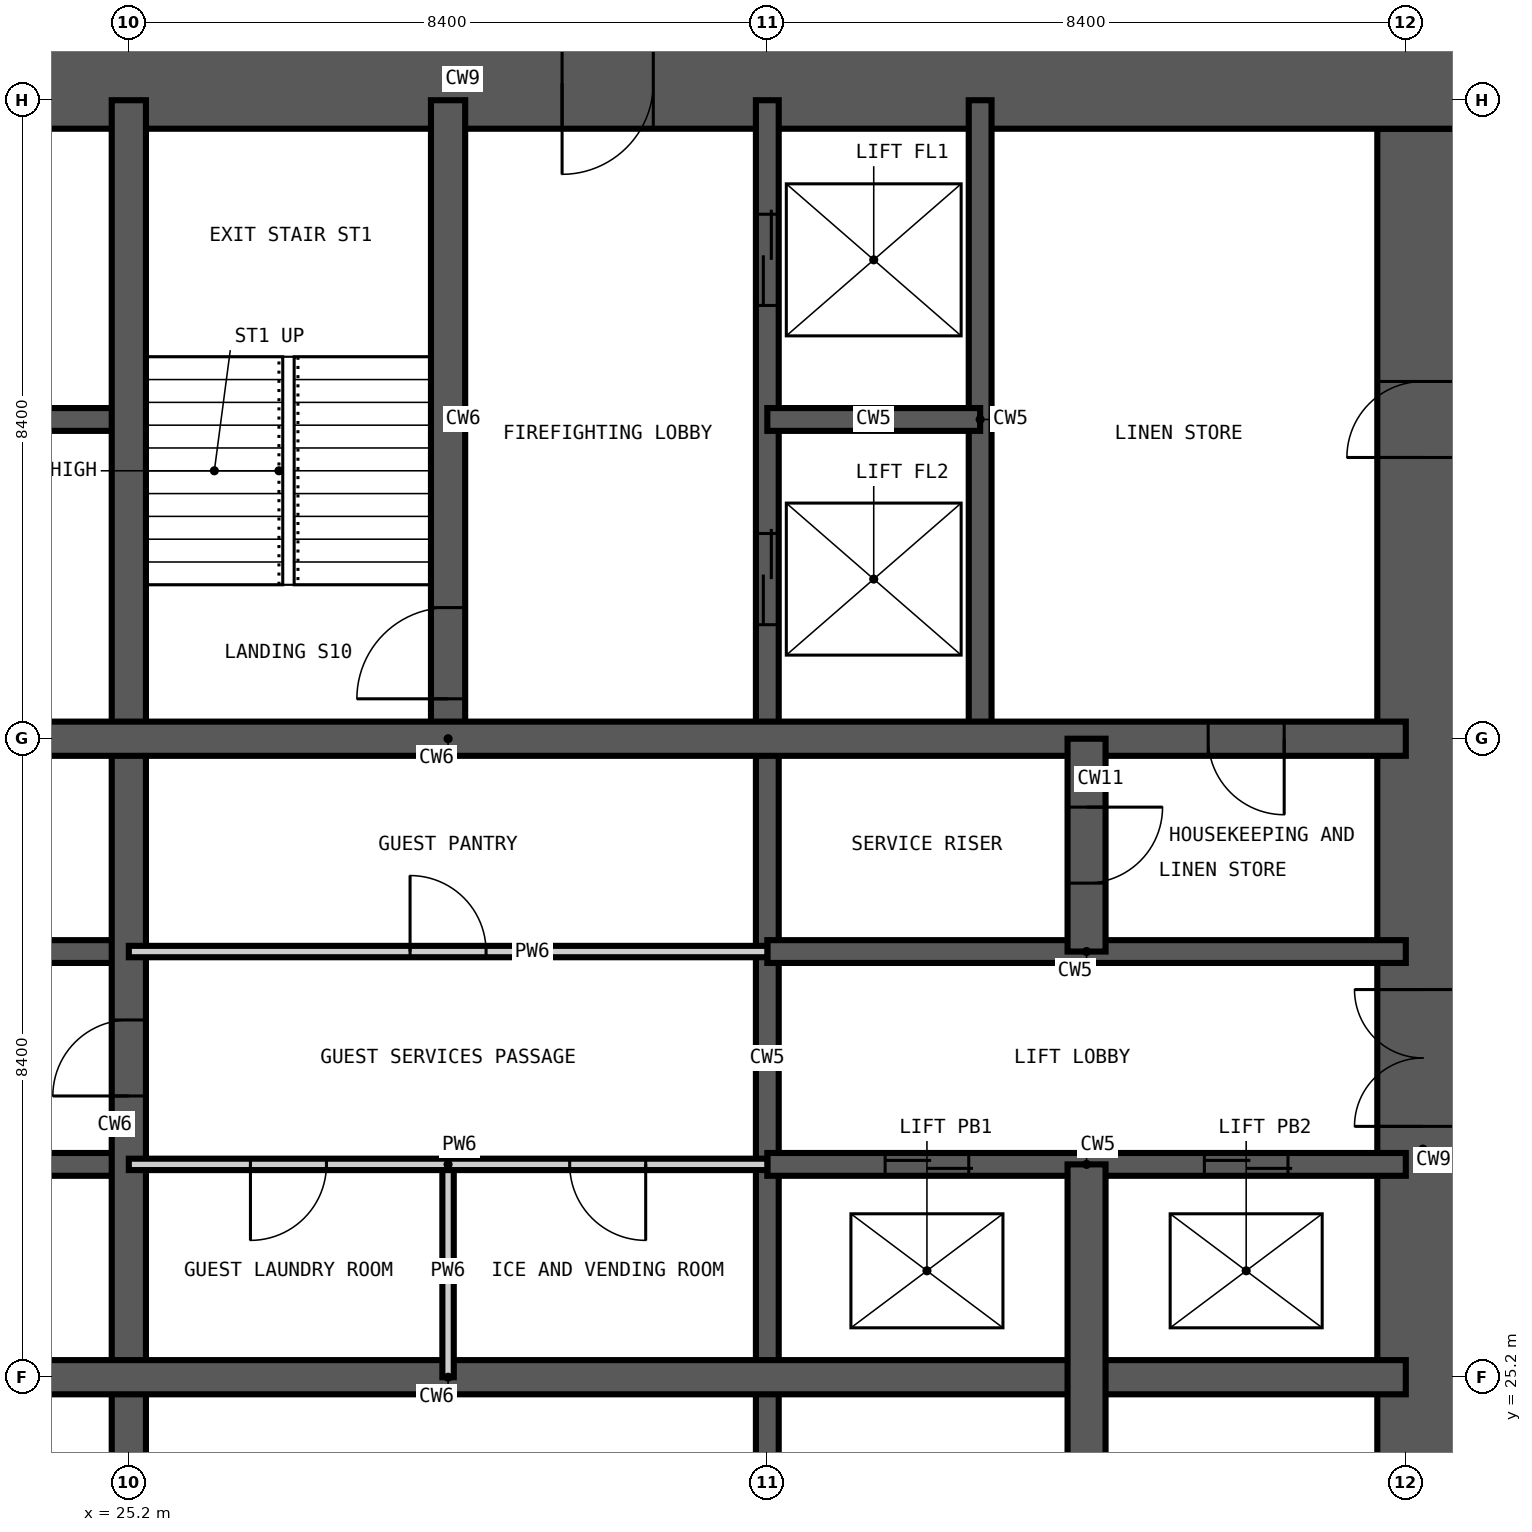
"""IFC4 building model, lengths in metres.
Left out: names, types, materials, properties, quantities, classifications, styles, units other than length and angle.
Written with IfcOpenShell. Run it as: python <this file> out.ifc"""

import sys

from ifc_helpers import new_model, si_unit, direction, frame, frame_2d, origin, place, context, subcontext, project, spatial, rectangle, extrude, element, fill, save


model = new_model("IFC4")
c1 = context("Model", 3, precision=1e-05, world=origin(), true_north=direction((0.0, 1.0)))
c2 = subcontext(c1, "Body", "Model", "MODEL_VIEW")
j1 = project(units=[si_unit("LENGTHUNIT", "METRE"), si_unit("PLANEANGLEUNIT", "RADIAN")], contexts=[c1])
p1 = place(None, origin())
s1 = spatial("IfcSite", under=j1, at=p1, CompositionType="ELEMENT")
p2 = place(p1, origin())
s2 = spatial("IfcBuilding", under=s1, at=p2, CompositionType="ELEMENT")
p3 = place(p2, frame((0.0, 0.0, 111.6)))
s3 = spatial("IfcBuildingStorey", under=s2, at=p3, CompositionType="ELEMENT", Elevation=111.6)
p4 = place(p3, frame((42.225, 17.175, -0.35), z_axis=(0.0, 0.0, 1.0), x_axis=(0.0, 1.0, 0.0)))
e1 = element("IfcWall", 1, at=p4, inside=s3, PredefinedType="SHEAR", context=c2, shape_type="SweptSolid", body=[
    extrude(rectangle(XDim=24.45, YDim=1.2, at=frame_2d((12.225, 0.0))), origin(), (0.0, 0.0, 1.0), 3.6),
])
p5 = place(p4, frame((0.425, 0.0, 0.35)))
e2 = element("IfcOpeningElement", 2, at=p5, cuts=e1, PredefinedType="OPENING", context=c2, shape_type="SweptSolid", body=[
    extrude(rectangle(XDim=1.2, YDim=2.2, at=frame_2d((0.6, 1.1))), frame((0.0, 0.61, 0.0), z_axis=(0.0, -1.0, 0.0), x_axis=(1.0, 0.0, 0.0)), (0.0, 0.0, 1.0), 1.22),
])
p6 = place(p4, frame((11.325, 0.0, 0.35)))
e3 = element("IfcOpeningElement", 3, at=p6, cuts=e1, PredefinedType="OPENING", context=c2, shape_type="SweptSolid", body=[
    extrude(rectangle(XDim=1.8, YDim=2.2, at=frame_2d((0.9, 1.1))), frame((0.0, 0.61, 0.0), z_axis=(0.0, -1.0, 0.0), x_axis=(1.0, 0.0, 0.0)), (0.0, 0.0, 1.0), 1.22),
])
p7 = place(p4, frame((20.125, 0.0, 0.35)))
e4 = element("IfcOpeningElement", 4, at=p7, cuts=e1, PredefinedType="OPENING", context=c2, shape_type="SweptSolid", body=[
    extrude(rectangle(XDim=1.0, YDim=2.1, at=frame_2d((0.5, 1.05))), frame((0.0, 0.61, 0.0), z_axis=(0.0, -1.0, 0.0), x_axis=(1.0, 0.0, 0.0)), (0.0, 0.0, 1.0), 1.22),
])
p8 = place(p3, frame((42.825, 42.225, -0.35), z_axis=(0.0, 0.0, 1.0), x_axis=(-1.0, 0.0, 0.0)))
e5 = element("IfcWall", 5, at=p8, inside=s3, PredefinedType="SHEAR", context=c2, shape_type="SweptSolid", body=[
    extrude(rectangle(XDim=26.85, YDim=1.2, at=frame_2d((13.425, 0.0))), origin(), (0.0, 0.0, 1.0), 3.6),
])
p9 = place(p8, frame((21.325, 0.0, 0.35)))
e6 = element("IfcOpeningElement", 6, at=p9, cuts=e5, PredefinedType="OPENING", context=c2, shape_type="SweptSolid", body=[
    extrude(rectangle(XDim=1.0, YDim=2.1, at=frame_2d((0.5, 1.05))), frame((0.0, 0.61, 0.0), z_axis=(0.0, -1.0, 0.0), x_axis=(1.0, 0.0, 0.0)), (0.0, 0.0, 1.0), 1.22),
])
p10 = place(p8, frame((10.725, 0.0, 0.35)))
e7 = element("IfcOpeningElement", 7, at=p10, cuts=e5, PredefinedType="OPENING", context=c2, shape_type="SweptSolid", body=[
    extrude(rectangle(XDim=1.2, YDim=2.2, at=frame_2d((0.6, 1.1))), frame((0.0, 0.61, 0.0), z_axis=(0.0, -1.0, 0.0), x_axis=(1.0, 0.0, 0.0)), (0.0, 0.0, 1.0), 1.22),
])
p11 = place(p3, frame((33.6, 16.8, -0.35), z_axis=(0.0, 0.0, 1.0), x_axis=(0.0, 1.0, 0.0)))
e8 = element("IfcWall", 8, at=p11, inside=s3, PredefinedType="SHEAR", context=c2, shape_type="SweptSolid", body=[
    extrude(rectangle(XDim=25.2, YDim=0.3, at=frame_2d((12.6, 0.0))), origin(), (0.0, 0.0, 1.0), 3.6),
])
p12 = place(p11, frame((22.5, 0.0, 0.35)))
e9 = element("IfcOpeningElement", 9, at=p12, cuts=e8, PredefinedType="OPENING", context=c2, shape_type="SweptSolid", body=[
    extrude(rectangle(XDim=1.2, YDim=2.2, at=frame_2d((0.6, 1.1))), frame((0.0, 0.16, 0.0), z_axis=(0.0, -1.0, 0.0), x_axis=(1.0, 0.0, 0.0)), (0.0, 0.0, 1.0), 0.32),
])
p13 = place(p11, frame((18.3, 0.0, 0.35)))
e10 = element("IfcOpeningElement", 10, at=p13, cuts=e8, PredefinedType="OPENING", context=c2, shape_type="SweptSolid", body=[
    extrude(rectangle(XDim=1.2, YDim=2.2, at=frame_2d((0.6, 1.1))), frame((0.0, 0.16, 0.0), z_axis=(0.0, -1.0, 0.0), x_axis=(1.0, 0.0, 0.0)), (0.0, 0.0, 1.0), 0.32),
])
p14 = place(p3, frame((36.4, 33.6, -0.35), z_axis=(0.0, 0.0, 1.0), x_axis=(0.0, 1.0, 0.0)))
e11 = element("IfcWall", 11, at=p14, inside=s3, PredefinedType="SHEAR", context=c2, shape_type="SweptSolid", body=[
    extrude(rectangle(XDim=8.4, YDim=0.3, at=frame_2d((4.2, 0.0))), origin(), (0.0, 0.0, 1.0), 3.6),
])
p15 = place(p3, frame((16.8, 28.0, -0.35), z_axis=(0.0, 0.0, 1.0), x_axis=(1.0, 0.0, 0.0)))
e12 = element("IfcWall", 12, at=p15, inside=s3, PredefinedType="SHEAR", context=c2, shape_type="SweptSolid", body=[
    extrude(rectangle(XDim=8.4, YDim=0.3, at=frame_2d((4.2, 0.0))), origin(), (0.0, 0.0, 1.0), 3.6),
])
p16 = place(p15, frame((1.55, 0.0, 0.35)))
e13 = element("IfcOpeningElement", 13, at=p16, cuts=e12, PredefinedType="OPENING", context=c2, shape_type="SweptSolid", body=[
    extrude(rectangle(XDim=1.1, YDim=2.2, at=frame_2d((0.55, 1.1))), frame((0.0, 0.16, 0.0), z_axis=(0.0, -1.0, 0.0), x_axis=(1.0, 0.0, 0.0)), (0.0, 0.0, 1.0), 0.32),
])
p17 = place(p15, frame((5.75, 0.0, 0.35)))
e14 = element("IfcOpeningElement", 14, at=p17, cuts=e12, PredefinedType="OPENING", context=c2, shape_type="SweptSolid", body=[
    extrude(rectangle(XDim=1.1, YDim=2.2, at=frame_2d((0.55, 1.1))), frame((0.0, 0.16, 0.0), z_axis=(0.0, -1.0, 0.0), x_axis=(1.0, 0.0, 0.0)), (0.0, 0.0, 1.0), 0.32),
])
p18 = place(p3, frame((33.6, 28.0, -0.35), z_axis=(0.0, 0.0, 1.0), x_axis=(1.0, 0.0, 0.0)))
e15 = element("IfcWall", 15, at=p18, inside=s3, PredefinedType="SHEAR", context=c2, shape_type="SweptSolid", body=[
    extrude(rectangle(XDim=8.4, YDim=0.3, at=frame_2d((4.2, 0.0))), origin(), (0.0, 0.0, 1.0), 3.6),
])
p19 = place(p18, frame((1.55, 0.0, 0.35)))
e16 = element("IfcOpeningElement", 16, at=p19, cuts=e15, PredefinedType="OPENING", context=c2, shape_type="SweptSolid", body=[
    extrude(rectangle(XDim=1.1, YDim=2.2, at=frame_2d((0.55, 1.1))), frame((0.0, 0.16, 0.0), z_axis=(0.0, -1.0, 0.0), x_axis=(1.0, 0.0, 0.0)), (0.0, 0.0, 1.0), 0.32),
])
p20 = place(p18, frame((5.75, 0.0, 0.35)))
e17 = element("IfcOpeningElement", 17, at=p20, cuts=e15, PredefinedType="OPENING", context=c2, shape_type="SweptSolid", body=[
    extrude(rectangle(XDim=1.1, YDim=2.2, at=frame_2d((0.55, 1.1))), frame((0.0, 0.16, 0.0), z_axis=(0.0, -1.0, 0.0), x_axis=(1.0, 0.0, 0.0)), (0.0, 0.0, 1.0), 0.32),
])
p21 = place(p3, frame((16.8, 30.8, -0.35), z_axis=(0.0, 0.0, 1.0), x_axis=(1.0, 0.0, 0.0)))
e18 = element("IfcWall", 18, at=p21, inside=s3, PredefinedType="SHEAR", context=c2, shape_type="SweptSolid", body=[
    extrude(rectangle(XDim=8.4, YDim=0.3, at=frame_2d((4.2, 0.0))), origin(), (0.0, 0.0, 1.0), 3.6),
])
p22 = place(p21, frame((1.55, 0.0, 0.35)))
e19 = element("IfcOpeningElement", 19, at=p22, cuts=e18, PredefinedType="OPENING", context=c2, shape_type="SweptSolid", body=[
    extrude(rectangle(XDim=1.1, YDim=2.2, at=frame_2d((0.55, 1.1))), frame((0.0, 0.16, 0.0), z_axis=(0.0, -1.0, 0.0), x_axis=(1.0, 0.0, 0.0)), (0.0, 0.0, 1.0), 0.32),
])
p23 = place(p21, frame((5.75, 0.0, 0.35)))
e20 = element("IfcOpeningElement", 20, at=p23, cuts=e18, PredefinedType="OPENING", context=c2, shape_type="SweptSolid", body=[
    extrude(rectangle(XDim=1.1, YDim=2.2, at=frame_2d((0.55, 1.1))), frame((0.0, 0.16, 0.0), z_axis=(0.0, -1.0, 0.0), x_axis=(1.0, 0.0, 0.0)), (0.0, 0.0, 1.0), 0.32),
])
for number, where, z_axis, x_axis in (
    (21, (33.6, 30.8, -0.35), (0.0, 0.0, 1.0), (1.0, 0.0, 0.0)),
    (22, (16.8, 37.8, -0.35), (0.0, 0.0, 1.0), (1.0, 0.0, 0.0)),
):
    element("IfcWall", number, at=place(p3, frame(where, z_axis=z_axis, x_axis=x_axis)), inside=s3, PredefinedType="SHEAR", context=c2, shape_type="SweptSolid", body=[
        extrude(rectangle(XDim=8.4, YDim=0.3, at=frame_2d((4.2, 0.0))), origin(), (0.0, 0.0, 1.0), 3.6),
    ])
p24 = place(p3, frame((33.6, 37.8, -0.35), z_axis=(0.0, 0.0, 1.0), x_axis=(1.0, 0.0, 0.0)))
e23 = element("IfcWall", 23, at=p24, inside=s3, PredefinedType="SHEAR", context=c2, shape_type="SweptSolid", body=[
    extrude(rectangle(XDim=2.8, YDim=0.3, at=frame_2d((1.4, 0.0))), origin(), (0.0, 0.0, 1.0), 3.6),
])
p25 = place(p3, frame((25.2, 16.8, -0.35), z_axis=(0.0, 0.0, 1.0), x_axis=(0.0, 1.0, 0.0)))
e24 = element("IfcWall", 24, at=p25, inside=s3, PredefinedType="SHEAR", context=c2, shape_type="SweptSolid", body=[
    extrude(rectangle(XDim=25.2, YDim=0.45, at=frame_2d((12.6, 0.0))), origin(), (0.0, 0.0, 1.0), 3.6),
])
p26 = place(p25, frame((12.1, 0.0, 0.35)))
e25 = element("IfcOpeningElement", 25, at=p26, cuts=e24, PredefinedType="OPENING", context=c2, shape_type="SweptSolid", body=[
    extrude(rectangle(XDim=1.0, YDim=2.1, at=frame_2d((0.5, 1.05))), frame((0.0, 0.235, 0.0), z_axis=(0.0, -1.0, 0.0), x_axis=(1.0, 0.0, 0.0)), (0.0, 0.0, 1.0), 0.47),
])
p27 = place(p3, frame((29.4, 33.6, -0.35), z_axis=(0.0, 0.0, 1.0), x_axis=(0.0, 1.0, 0.0)))
e26 = element("IfcWall", 26, at=p27, inside=s3, PredefinedType="SHEAR", context=c2, shape_type="SweptSolid", body=[
    extrude(rectangle(XDim=8.4, YDim=0.45, at=frame_2d((4.2, 0.0))), origin(), (0.0, 0.0, 1.0), 3.6),
])
p28 = place(p27, frame((0.525, 0.0, 0.35)))
e27 = element("IfcOpeningElement", 27, at=p28, cuts=e26, PredefinedType="OPENING", context=c2, shape_type="SweptSolid", body=[
    extrude(rectangle(XDim=1.2, YDim=2.2, at=frame_2d((0.6, 1.1))), frame((0.0, 0.235, 0.0), z_axis=(0.0, -1.0, 0.0), x_axis=(1.0, 0.0, 0.0)), (0.0, 0.0, 1.0), 0.47),
])
p29 = place(p3, frame((16.8, 25.2, -0.35), z_axis=(0.0, 0.0, 1.0), x_axis=(1.0, 0.0, 0.0)))
e28 = element("IfcWall", 28, at=p29, inside=s3, PredefinedType="SHEAR", context=c2, shape_type="SweptSolid", body=[
    extrude(rectangle(XDim=25.2, YDim=0.45, at=frame_2d((12.6, 0.0))), origin(), (0.0, 0.0, 1.0), 3.6),
])
p30 = place(p3, frame((16.8, 33.6, -0.35), z_axis=(0.0, 0.0, 1.0), x_axis=(1.0, 0.0, 0.0)))
e29 = element("IfcWall", 29, at=p30, inside=s3, PredefinedType="SHEAR", context=c2, shape_type="SweptSolid", body=[
    extrude(rectangle(XDim=25.2, YDim=0.45, at=frame_2d((12.6, 0.0))), origin(), (0.0, 0.0, 1.0), 3.6),
])
p31 = place(p30, frame((22.6, 0.0, 0.35)))
e30 = element("IfcOpeningElement", 30, at=p31, cuts=e29, PredefinedType="OPENING", context=c2, shape_type="SweptSolid", body=[
    extrude(rectangle(XDim=1.0, YDim=2.1, at=frame_2d((0.5, 1.05))), frame((0.0, 0.235, 0.0), z_axis=(0.0, -1.0, 0.0), x_axis=(1.0, 0.0, 0.0)), (0.0, 0.0, 1.0), 0.47),
])
p32 = place(p3, frame((37.8, 16.8, -0.35), z_axis=(0.0, 0.0, 1.0), x_axis=(0.0, 1.0, 0.0)))
e31 = element("IfcWall", 31, at=p32, inside=s3, PredefinedType="SHEAR", context=c2, shape_type="SweptSolid", body=[
    extrude(rectangle(XDim=11.2, YDim=0.5, at=frame_2d((5.6, 0.0))), origin(), (0.0, 0.0, 1.0), 3.6),
])
p33 = place(p3, frame((37.8, 30.8, -0.35), z_axis=(0.0, 0.0, 1.0), x_axis=(0.0, 1.0, 0.0)))
e32 = element("IfcWall", 32, at=p33, inside=s3, PredefinedType="SHEAR", context=c2, shape_type="SweptSolid", body=[
    extrude(rectangle(XDim=2.8, YDim=0.5, at=frame_2d((1.4, 0.0))), origin(), (0.0, 0.0, 1.0), 3.6),
])
p34 = place(p33, frame((0.9, 0.0, 0.35)))
e33 = element("IfcOpeningElement", 33, at=p34, cuts=e32, PredefinedType="OPENING", context=c2, shape_type="SweptSolid", body=[
    extrude(rectangle(XDim=1.0, YDim=2.1, at=frame_2d((0.5, 1.05))), frame((0.0, 0.26, 0.0), z_axis=(0.0, -1.0, 0.0), x_axis=(1.0, 0.0, 0.0)), (0.0, 0.0, 1.0), 0.52),
])
p35 = place(p3, frame((29.4, 25.2, 0.0), z_axis=(0.0, 0.0, 1.0), x_axis=(0.0, 1.0, 0.0)))
e34 = element("IfcWall", 34, at=p35, inside=s3, PredefinedType="PARTITIONING", context=c2, shape_type="SweptSolid", body=[
    extrude(rectangle(XDim=2.8, YDim=0.15, at=frame_2d((1.4, 0.0))), origin(), (0.0, 0.0, 1.0), 3.25),
])
p36 = place(p3, frame((25.2, 28.0, 0.0), z_axis=(0.0, 0.0, 1.0), x_axis=(1.0, 0.0, 0.0)))
e35 = element("IfcWall", 35, at=p36, inside=s3, PredefinedType="PARTITIONING", context=c2, shape_type="SweptSolid", body=[
    extrude(rectangle(XDim=8.4, YDim=0.15, at=frame_2d((4.2, 0.0))), origin(), (0.0, 0.0, 1.0), 3.25),
])
p37 = place(p36, frame((1.6, 0.0, 0.0)))
e36 = element("IfcOpeningElement", 36, at=p37, cuts=e35, PredefinedType="OPENING", context=c2, shape_type="SweptSolid", body=[
    extrude(rectangle(XDim=1.0, YDim=2.1, at=frame_2d((0.5, 1.05))), frame((0.0, 0.085, 0.0), z_axis=(0.0, -1.0, 0.0), x_axis=(1.0, 0.0, 0.0)), (0.0, 0.0, 1.0), 0.17),
])
p38 = place(p36, frame((5.8, 0.0, 0.0)))
e37 = element("IfcOpeningElement", 37, at=p38, cuts=e35, PredefinedType="OPENING", context=c2, shape_type="SweptSolid", body=[
    extrude(rectangle(XDim=1.0, YDim=2.1, at=frame_2d((0.5, 1.05))), frame((0.0, 0.085, 0.0), z_axis=(0.0, -1.0, 0.0), x_axis=(1.0, 0.0, 0.0)), (0.0, 0.0, 1.0), 0.17),
])
p39 = place(p3, frame((25.2, 30.8, 0.0), z_axis=(0.0, 0.0, 1.0), x_axis=(1.0, 0.0, 0.0)))
e38 = element("IfcWall", 38, at=p39, inside=s3, PredefinedType="PARTITIONING", context=c2, shape_type="SweptSolid", body=[
    extrude(rectangle(XDim=8.4, YDim=0.15, at=frame_2d((4.2, 0.0))), origin(), (0.0, 0.0, 1.0), 3.25),
])
p40 = place(p39, frame((3.7, 0.0, 0.0)))
e39 = element("IfcOpeningElement", 39, at=p40, cuts=e38, PredefinedType="OPENING", context=c2, shape_type="SweptSolid", body=[
    extrude(rectangle(XDim=1.0, YDim=2.1, at=frame_2d((0.5, 1.05))), frame((0.0, 0.085, 0.0), z_axis=(0.0, -1.0, 0.0), x_axis=(1.0, 0.0, 0.0)), (0.0, 0.0, 1.0), 0.17),
])
p41 = place(p28, origin())
e40 = element("IfcDoor", 40, at=p41, inside=s3, OperationType="SINGLE_SWING_LEFT", PredefinedType="DOOR", context=c2, shape_type="SweptSolid", body=[
    extrude(rectangle(XDim=1.2, YDim=2.2, at=frame_2d((0.6, 1.1))), frame((0.0, 0.025, 0.0), z_axis=(0.0, -1.0, 0.0), x_axis=(1.0, 0.0, 0.0)), (0.0, 0.0, 1.0), 0.05),
])
fill(e27, e40)
p42 = place(p19, origin())
e41 = element("IfcDoor", 41, at=p42, inside=s3, OperationType="DOUBLE_DOOR_SLIDING", PredefinedType="DOOR", context=c2, shape_type="SweptSolid", body=[
    extrude(rectangle(XDim=1.1, YDim=2.2, at=frame_2d((0.55, 1.1))), frame((0.0, 0.025, 0.0), z_axis=(0.0, -1.0, 0.0), x_axis=(1.0, 0.0, 0.0)), (0.0, 0.0, 1.0), 0.05),
])
fill(e16, e41)
p43 = place(p20, origin())
e42 = element("IfcDoor", 42, at=p43, inside=s3, OperationType="DOUBLE_DOOR_SLIDING", PredefinedType="DOOR", context=c2, shape_type="SweptSolid", body=[
    extrude(rectangle(XDim=1.1, YDim=2.2, at=frame_2d((0.55, 1.1))), frame((0.0, 0.025, 0.0), z_axis=(0.0, -1.0, 0.0), x_axis=(1.0, 0.0, 0.0)), (0.0, 0.0, 1.0), 0.05),
])
fill(e17, e42)
p44 = place(p12, origin())
e43 = element("IfcDoor", 43, at=p44, inside=s3, OperationType="DOUBLE_DOOR_SLIDING", PredefinedType="DOOR", context=c2, shape_type="SweptSolid", body=[
    extrude(rectangle(XDim=1.2, YDim=2.2, at=frame_2d((0.6, 1.1))), frame((0.0, 0.025, 0.0), z_axis=(0.0, -1.0, 0.0), x_axis=(1.0, 0.0, 0.0)), (0.0, 0.0, 1.0), 0.05),
])
fill(e9, e43)
p45 = place(p13, origin())
e44 = element("IfcDoor", 44, at=p45, inside=s3, OperationType="DOUBLE_DOOR_SLIDING", PredefinedType="DOOR", context=c2, shape_type="SweptSolid", body=[
    extrude(rectangle(XDim=1.2, YDim=2.2, at=frame_2d((0.6, 1.1))), frame((0.0, 0.025, 0.0), z_axis=(0.0, -1.0, 0.0), x_axis=(1.0, 0.0, 0.0)), (0.0, 0.0, 1.0), 0.05),
])
fill(e10, e44)
p46 = place(p26, origin())
e45 = element("IfcDoor", 45, at=p46, inside=s3, OperationType="SINGLE_SWING_LEFT", PredefinedType="DOOR", context=c2, shape_type="SweptSolid", body=[
    extrude(rectangle(XDim=1.0, YDim=2.1, at=frame_2d((0.5, 1.05))), frame((0.0, 0.025, 0.0), z_axis=(0.0, -1.0, 0.0), x_axis=(1.0, 0.0, 0.0)), (0.0, 0.0, 1.0), 0.05),
])
fill(e25, e45)
p47 = place(p37, frame((1.0, 0.0, 0.0), z_axis=(0.0, 0.0, 1.0), x_axis=(-1.0, 0.0, 0.0)))
e46 = element("IfcDoor", 46, at=p47, inside=s3, OperationType="SINGLE_SWING_RIGHT", PredefinedType="DOOR", context=c2, shape_type="SweptSolid", body=[
    extrude(rectangle(XDim=1.0, YDim=2.1, at=frame_2d((0.5, 1.05))), frame((0.0, 0.025, 0.0), z_axis=(0.0, -1.0, 0.0), x_axis=(1.0, 0.0, 0.0)), (0.0, 0.0, 1.0), 0.05),
])
fill(e36, e46)
p48 = place(p38, frame((1.0, 0.0, 0.0), z_axis=(0.0, 0.0, 1.0), x_axis=(-1.0, 0.0, 0.0)))
e47 = element("IfcDoor", 47, at=p48, inside=s3, OperationType="SINGLE_SWING_LEFT", PredefinedType="DOOR", context=c2, shape_type="SweptSolid", body=[
    extrude(rectangle(XDim=1.0, YDim=2.1, at=frame_2d((0.5, 1.05))), frame((0.0, 0.025, 0.0), z_axis=(0.0, -1.0, 0.0), x_axis=(1.0, 0.0, 0.0)), (0.0, 0.0, 1.0), 0.05),
])
fill(e37, e47)
p49 = place(p40, origin())
e48 = element("IfcDoor", 48, at=p49, inside=s3, OperationType="SINGLE_SWING_LEFT", PredefinedType="DOOR", context=c2, shape_type="SweptSolid", body=[
    extrude(rectangle(XDim=1.0, YDim=2.1, at=frame_2d((0.5, 1.05))), frame((0.0, 0.025, 0.0), z_axis=(0.0, -1.0, 0.0), x_axis=(1.0, 0.0, 0.0)), (0.0, 0.0, 1.0), 0.05),
])
fill(e39, e48)
p50 = place(p34, frame((1.0, 0.0, 0.0), z_axis=(0.0, 0.0, 1.0), x_axis=(-1.0, 0.0, 0.0)))
e49 = element("IfcDoor", 49, at=p50, inside=s3, OperationType="SINGLE_SWING_LEFT", PredefinedType="DOOR", context=c2, shape_type="SweptSolid", body=[
    extrude(rectangle(XDim=1.0, YDim=2.1, at=frame_2d((0.5, 1.05))), frame((0.0, 0.025, 0.0), z_axis=(0.0, -1.0, 0.0), x_axis=(1.0, 0.0, 0.0)), (0.0, 0.0, 1.0), 0.05),
])
fill(e33, e49)
p51 = place(p31, frame((1.0, 0.0, 0.0), z_axis=(0.0, 0.0, 1.0), x_axis=(-1.0, 0.0, 0.0)))
e50 = element("IfcDoor", 50, at=p51, inside=s3, OperationType="SINGLE_SWING_LEFT", PredefinedType="DOOR", context=c2, shape_type="SweptSolid", body=[
    extrude(rectangle(XDim=1.0, YDim=2.1, at=frame_2d((0.5, 1.05))), frame((0.0, 0.025, 0.0), z_axis=(0.0, -1.0, 0.0), x_axis=(1.0, 0.0, 0.0)), (0.0, 0.0, 1.0), 0.05),
])
fill(e30, e50)
p52 = place(p6, origin())
e51 = element("IfcDoor", 51, at=p52, inside=s3, OperationType="DOUBLE_DOOR_DOUBLE_SWING", PredefinedType="DOOR", context=c2, shape_type="SweptSolid", body=[
    extrude(rectangle(XDim=1.8, YDim=2.2, at=frame_2d((0.9, 1.1))), frame((0.0, 0.025, 0.0), z_axis=(0.0, -1.0, 0.0), x_axis=(1.0, 0.0, 0.0)), (0.0, 0.0, 1.0), 0.05),
])
fill(e3, e51)
p53 = place(p10, origin())
e52 = element("IfcDoor", 52, at=p53, inside=s3, OperationType="SINGLE_SWING_RIGHT", PredefinedType="DOOR", context=c2, shape_type="SweptSolid", body=[
    extrude(rectangle(XDim=1.2, YDim=2.2, at=frame_2d((0.6, 1.1))), frame((0.0, 0.025, 0.0), z_axis=(0.0, -1.0, 0.0), x_axis=(1.0, 0.0, 0.0)), (0.0, 0.0, 1.0), 0.05),
])
fill(e7, e52)
p54 = place(p7, origin())
e53 = element("IfcDoor", 53, at=p54, inside=s3, OperationType="SINGLE_SWING_LEFT", PredefinedType="DOOR", context=c2, shape_type="SweptSolid", body=[
    extrude(rectangle(XDim=1.0, YDim=2.1, at=frame_2d((0.5, 1.05))), frame((0.0, 0.025, 0.0), z_axis=(0.0, -1.0, 0.0), x_axis=(1.0, 0.0, 0.0)), (0.0, 0.0, 1.0), 0.05),
])
fill(e4, e53)
save(model, sys.argv[1])
